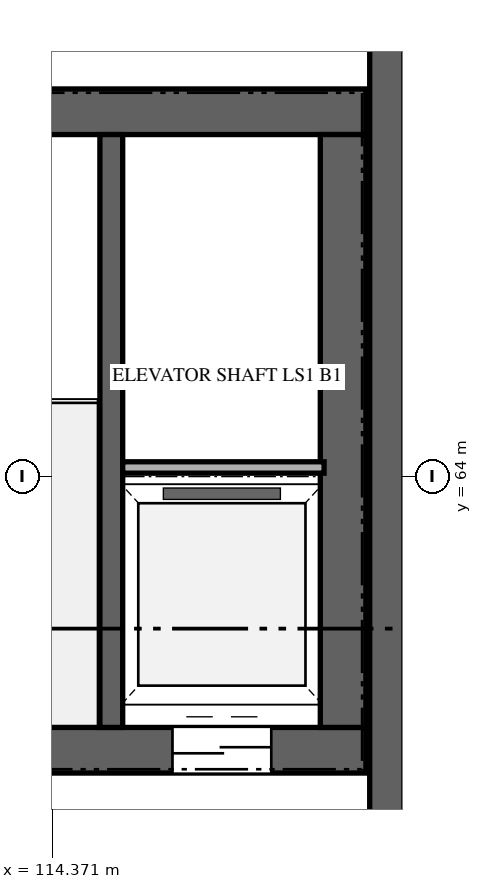
"""IFC4 building model, lengths in metres.
Left out: names, types, materials, properties, quantities, classifications, styles, units other than length and angle.
Written with IfcOpenShell. Run it as: python <this file> out.ifc"""

import sys

from ifc_helpers import new_model, si_unit, direction, frame, frame_2d, origin, place, context, subcontext, project, spatial, rectangle, extrude, element, fill, save


model = new_model("IFC4")
c1 = context("Model", 3, precision=1e-05, world=origin(), true_north=direction((0.0, 1.0)))
c2 = subcontext(c1, "Body", "Model", "MODEL_VIEW")
j1 = project(units=[si_unit("LENGTHUNIT", "METRE"), si_unit("PLANEANGLEUNIT", "RADIAN")], contexts=[c1])
p1 = place(None, origin())
s1 = spatial("IfcSite", under=j1, at=p1, CompositionType="ELEMENT")
p2 = place(p1, origin())
s2 = spatial("IfcBuilding", under=s1, at=p2, CompositionType="ELEMENT")
p3 = place(p2, frame((0.0, 0.0, -4.8)))
s3 = spatial("IfcBuildingStorey", under=s2, at=p3, CompositionType="ELEMENT", Elevation=-4.8)
p4 = place(p3, frame((118.775, 56.42, 0.0), z_axis=(0.0, 0.0, 1.0), x_axis=(0.0, 1.0, 0.0)))
e1 = element("IfcWall", 1, at=p4, inside=s3, PredefinedType="SHEAR", context=c2, shape_type="SweptSolid", body=[
    extrude(rectangle(XDim=39.24, YDim=0.45, at=frame_2d((19.62, 0.0))), origin(), (0.0, 0.0, 1.0), 4.45),
])
p5 = place(p3, frame((105.7, 60.4, 0.0), z_axis=(0.0, 0.0, 1.0), x_axis=(1.0, 0.0, 0.0)))
e2 = element("IfcWall", 2, at=p5, inside=s3, PredefinedType="SHEAR", context=c2, shape_type="SweptSolid", body=[
    extrude(rectangle(XDim=12.8, YDim=0.6, at=frame_2d((6.4, 0.0))), origin(), (0.0, 0.0, 1.0), 4.8),
])
p6 = place(p5, frame((1.05, 0.0, 0.0)))
e3 = element("IfcOpeningElement", 3, at=p6, cuts=e2, PredefinedType="OPENING", context=c2, shape_type="SweptSolid", body=[
    extrude(rectangle(XDim=1.15, YDim=2.25, at=frame_2d((0.575, 1.125))), frame((0.0, 0.31, 0.0), z_axis=(0.0, -1.0, 0.0), x_axis=(1.0, 0.0, 0.0)), (0.0, 0.0, 1.0), 0.62),
])
p7 = place(p5, frame((10.255, 0.0, 0.0)))
e4 = element("IfcOpeningElement", 4, at=p7, cuts=e2, PredefinedType="OPENING", context=c2, shape_type="SweptSolid", body=[
    extrude(rectangle(XDim=1.3, YDim=2.3, at=frame_2d((0.65, 1.15))), frame((0.0, 0.31, 0.0), z_axis=(0.0, -1.0, 0.0), x_axis=(1.0, 0.0, 0.0)), (0.0, 0.0, 1.0), 0.62),
])
p8 = place(p3, frame((105.7, 68.8, 0.0), z_axis=(0.0, 0.0, 1.0), x_axis=(1.0, 0.0, 0.0)))
e5 = element("IfcWall", 5, at=p8, inside=s3, PredefinedType="SHEAR", context=c2, shape_type="SweptSolid", body=[
    extrude(rectangle(XDim=12.8, YDim=0.6, at=frame_2d((6.4, 0.0))), origin(), (0.0, 0.0, 1.0), 4.8),
])
p9 = place(p3, frame((118.2, 60.7, 0.0), z_axis=(0.0, 0.0, 1.0), x_axis=(0.0, 1.0, 0.0)))
e6 = element("IfcWall", 6, at=p9, inside=s3, PredefinedType="SHEAR", context=c2, shape_type="SweptSolid", body=[
    extrude(rectangle(XDim=7.8, YDim=0.6, at=frame_2d((3.9, 0.0))), origin(), (0.0, 0.0, 1.0), 4.8),
])
p10 = place(p3, frame((115.15, 60.7, 0.0), z_axis=(0.0, 0.0, 1.0), x_axis=(0.0, 1.0, 0.0)))
e7 = element("IfcWall", 7, at=p10, inside=s3, PredefinedType="SHEAR", context=c2, shape_type="SweptSolid", body=[
    extrude(rectangle(XDim=7.8, YDim=0.3, at=frame_2d((3.9, 0.0))), origin(), (0.0, 0.0, 1.0), 4.8),
])
p11 = place(p3, frame((115.3, 64.12, 0.0), z_axis=(0.0, 0.0, 1.0), x_axis=(1.0, 0.0, 0.0)))
e8 = element("IfcWall", 8, at=p11, inside=s3, PredefinedType="PARTITIONING", context=c2, shape_type="SweptSolid", body=[
    extrude(rectangle(XDim=2.65, YDim=0.15, at=frame_2d((1.325, 0.0))), origin(), (0.0, 0.0, 1.0), 4.45),
])
p12 = place(p7, frame((1.3, 0.0, 0.0), z_axis=(0.0, 0.0, 1.0), x_axis=(-1.0, 0.0, 0.0)))
e9 = element("IfcDoor", 9, at=p12, inside=s3, OperationType="DOUBLE_DOOR_SLIDING", PredefinedType="DOOR", context=c2, shape_type="SweptSolid", body=[
    extrude(rectangle(XDim=1.3, YDim=2.3, at=frame_2d((0.65, 1.15))), frame((0.0, 0.025, 0.0), z_axis=(0.0, -1.0, 0.0), x_axis=(1.0, 0.0, 0.0)), (0.0, 0.0, 1.0), 0.05),
])
fill(e4, e9)
save(model, sys.argv[1])
